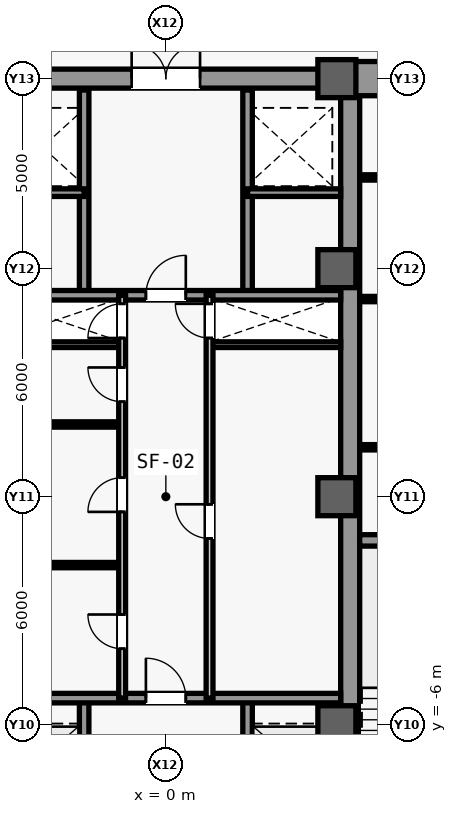
"""IFC4 building model, lengths in metres.
Left out: names, types, materials, properties, quantities, classifications, styles, units other than length and angle.
Written with IfcOpenShell. Run it as: python <this file> out.ifc"""

import sys

from ifc_helpers import new_model, si_unit, direction, frame, frame_2d, origin, origin_2d, place, context, subcontext, project, spatial, rectangle, extrude, source, transform, mapped, element, fill, save


model = new_model("IFC4")
c1 = context("Model", 3, precision=1e-05, world=origin(), true_north=direction((0.0, 1.0)))
c2 = subcontext(c1, "Body", "Model", "MODEL_VIEW")
j1 = project(units=[si_unit("LENGTHUNIT", "METRE"), si_unit("PLANEANGLEUNIT", "RADIAN")], contexts=[c1])
p1 = place(None, origin())
s1 = spatial("IfcSite", under=j1, at=p1, CompositionType="ELEMENT")
p2 = place(p1, origin())
s2 = spatial("IfcBuilding", under=s1, at=p2, CompositionType="ELEMENT")
p3 = place(p2, frame((0.0, 0.0, 6.6)))
s3 = spatial("IfcBuildingStorey", under=s2, at=p3, CompositionType="ELEMENT", Elevation=6.6)
m1 = source(origin(), c2, "Body", "SweptSolid", [
    extrude(rectangle(XDim=21.4, YDim=0.5, at=frame_2d((10.7, 0.0))), origin(), (0.0, 0.0, 1.0), 5.08),
])
p4 = place(p3, frame((4.85, -10.7, 0.0), z_axis=(0.0, 0.0, 1.0), x_axis=(0.0, 1.0, 0.0)))
e1 = element("IfcWall", 1, at=p4, inside=s3, PredefinedType="SHEAR", context=c2, shape_type="MappedRepresentation", body=[
    mapped(m1, transform((0.0, 0.0, 0.0), scale=1.0)),
])
m2 = source(origin(), c2, "Body", "SweptSolid", [
    extrude(rectangle(XDim=5.85, YDim=0.9, at=frame_2d((2.925, 0.0))), origin(), (0.0, 0.0, 1.0), 5.08),
])
p5 = place(p3, frame((4.85, 11.0, 0.0), z_axis=(0.0, 0.0, 1.0), x_axis=(1.0, 0.0, 0.0)))
e2 = element("IfcWall", 2, at=p5, inside=s3, PredefinedType="SHEAR", context=c2, shape_type="MappedRepresentation", body=[
    mapped(m2, transform((0.0, 0.0, 0.0), scale=1.0)),
])
m3 = source(origin(), c2, "Body", "SweptSolid", [
    extrude(rectangle(XDim=1.05, YDim=2.2, at=frame_2d((0.525, 1.1))), frame((0.0, 0.46, 0.0), z_axis=(0.0, -1.0, 0.0), x_axis=(1.0, 0.0, 0.0)), (0.0, 0.0, 1.0), 0.92),
])
p6 = place(p5, frame((1.375, 0.0, 0.0)))
e3 = element("IfcOpeningElement", 3, at=p6, cuts=e2, PredefinedType="OPENING", context=c2, shape_type="MappedRepresentation", body=[
    mapped(m3, transform((0.0, 0.0, 0.0), scale=1.0)),
])
m4 = source(origin(), c2, "Body", "SweptSolid", [
    extrude(rectangle(XDim=5.6, YDim=0.3, at=frame_2d((2.8, 0.0))), origin(), (0.0, 0.0, 1.0), 5.08),
])
p7 = place(p3, frame((5.1, -1.15, 0.0), z_axis=(0.0, 0.0, 1.0), x_axis=(1.0, 0.0, 0.0)))
e4 = element("IfcWall", 4, at=p7, inside=s3, PredefinedType="SHEAR", context=c2, shape_type="MappedRepresentation", body=[
    mapped(m4, transform((0.0, 0.0, 0.0), scale=1.0)),
])
m5 = source(origin(), c2, "Body", "SweptSolid", [
    extrude(rectangle(XDim=9.2, YDim=0.5, at=frame_2d((4.6, 0.0))), origin(), (0.0, 0.0, 1.0), 5.08),
])
p8 = place(p3, frame((-4.6, 11.0, 0.0), z_axis=(0.0, 0.0, 1.0), x_axis=(1.0, 0.0, 0.0)))
e5 = element("IfcWall", 5, at=p8, inside=s3, PredefinedType="SHEAR", context=c2, shape_type="MappedRepresentation", body=[
    mapped(m5, transform((0.0, 0.0, 0.0), scale=1.0)),
])
m6 = source(origin(), c2, "Body", "SweptSolid", [
    extrude(rectangle(XDim=1.8, YDim=2.25, at=frame_2d((0.9, 1.125))), frame((0.0, 0.26, 0.0), z_axis=(0.0, -1.0, 0.0), x_axis=(1.0, 0.0, 0.0)), (0.0, 0.0, 1.0), 0.52),
])
p9 = place(p8, frame((3.7, 0.0, 0.0)))
e6 = element("IfcOpeningElement", 6, at=p9, cuts=e5, PredefinedType="OPENING", context=c2, shape_type="MappedRepresentation", body=[
    mapped(m6, transform((0.0, 0.0, 0.0), scale=1.0)),
])
m7 = source(origin(), c2, "Body", "SweptSolid", [
    extrude(rectangle(XDim=1.0, YDim=1.0, at=origin_2d()), origin(), (0.0, 0.0, 1.0), 5.4),
])
for number, where, z_axis, x_axis in (
    (7, (4.5, -6.0, 0.0), (0.0, 0.0, 1.0), (1.0, 0.0, 0.0)),
    (8, (4.5, 0.0, 0.0), (0.0, 0.0, 1.0), (1.0, 0.0, 0.0)),
    (9, (4.5, 6.0, 0.0), (0.0, 0.0, 1.0), (1.0, 0.0, 0.0)),
    (10, (4.5, 11.0, 0.0), (0.0, 0.0, 1.0), (1.0, 0.0, 0.0)),
):
    element("IfcColumn", number, at=place(p3, frame(where, z_axis=z_axis, x_axis=x_axis)), inside=s3, PredefinedType="COLUMN", context=c2, shape_type="MappedRepresentation", body=[
        mapped(m7, transform((0.0, 0.0, 0.0), scale=1.0)),
    ])
m8 = source(origin(), c2, "Body", "SweptSolid", [
    extrude(rectangle(XDim=3.15, YDim=0.14, at=frame_2d((1.575, 0.0))), origin(), (0.0, 0.0, 1.0), 5.08),
])
p10 = place(p3, frame((5.1, 1.3, 0.0), z_axis=(0.0, 0.0, 1.0), x_axis=(1.0, 0.0, 0.0)))
e11 = element("IfcWall", 11, at=p10, inside=s3, PredefinedType="PARTITIONING", context=c2, shape_type="MappedRepresentation", body=[
    mapped(m8, transform((0.0, 0.0, 0.0), scale=1.0)),
])
p11 = place(p3, frame((5.1, 8.4, 0.0), z_axis=(0.0, 0.0, 1.0), x_axis=(1.0, 0.0, 0.0)))
e12 = element("IfcWall", 12, at=p11, inside=s3, PredefinedType="PARTITIONING", context=c2, shape_type="MappedRepresentation", body=[
    mapped(m8, transform((0.0, 0.0, 0.0), scale=1.0)),
])
m9 = source(origin(), c2, "Body", "SweptSolid", [
    extrude(rectangle(XDim=0.9, YDim=2.15, at=frame_2d((0.45, 1.075))), frame((0.0, 0.08, 0.0), z_axis=(0.0, -1.0, 0.0), x_axis=(1.0, 0.0, 0.0)), (0.0, 0.0, 1.0), 0.16),
])
p12 = place(p11, frame((1.13, 0.0, 0.0)))
e13 = element("IfcOpeningElement", 13, at=p12, cuts=e12, PredefinedType="OPENING", context=c2, shape_type="MappedRepresentation", body=[
    mapped(m9, transform((0.0, 0.0, 0.0), scale=1.0)),
])
p13 = place(p3, frame((5.1, 5.2, 0.0), z_axis=(0.0, 0.0, 1.0), x_axis=(1.0, 0.0, 0.0)))
e14 = element("IfcWall", 14, at=p13, inside=s3, PredefinedType="PARTITIONING", context=c2, shape_type="MappedRepresentation", body=[
    mapped(m8, transform((0.0, 0.0, 0.0), scale=1.0)),
])
p14 = place(p13, frame((1.13, 0.0, 0.0)))
e15 = element("IfcOpeningElement", 15, at=p14, cuts=e14, PredefinedType="OPENING", context=c2, shape_type="MappedRepresentation", body=[
    mapped(m9, transform((0.0, 0.0, 0.0), scale=1.0)),
])
m10 = source(origin(), c2, "Body", "SweptSolid", [
    extrude(rectangle(XDim=3.45, YDim=0.15, at=frame_2d((1.725, 0.0))), origin(), (0.0, 0.0, 1.0), 5.08),
])
for number, where, z_axis, x_axis in (
    (16, (-4.6, 4.0, 0.0), (0.0, 0.0, 1.0), (1.0, 0.0, 0.0)),
    (17, (1.15, 4.0, 0.0), (0.0, 0.0, 1.0), (1.0, 0.0, 0.0)),
):
    element("IfcWall", number, at=place(p3, frame(where, z_axis=z_axis, x_axis=x_axis)), inside=s3, PredefinedType="PARTITIONING", context=c2, shape_type="MappedRepresentation", body=[
        mapped(m10, transform((0.0, 0.0, 0.0), scale=1.0)),
    ])
m11 = source(origin(), c2, "Body", "SweptSolid", [
    extrude(rectangle(XDim=5.4, YDim=0.25, at=frame_2d((2.7, 0.0))), origin(), (0.0, 0.0, 1.0), 5.08),
])
p15 = place(p3, frame((-2.15, -10.7, 0.0), z_axis=(0.0, 0.0, 1.0), x_axis=(0.0, 1.0, 0.0)))
e18 = element("IfcWall", 18, at=p15, inside=s3, PredefinedType="SHEAR", context=c2, shape_type="MappedRepresentation", body=[
    mapped(m11, transform((0.0, 0.0, 0.0), scale=1.0)),
])
m12 = source(origin(), c2, "Body", "SweptSolid", [
    extrude(rectangle(XDim=1.2, YDim=2.3, at=frame_2d((0.6, 1.15))), frame((0.0, 0.135, 0.0), z_axis=(0.0, -1.0, 0.0), x_axis=(1.0, 0.0, 0.0)), (0.0, 0.0, 1.0), 0.27),
])
p16 = place(p15, frame((0.9, 0.0, 0.0)))
e19 = element("IfcOpeningElement", 19, at=p16, cuts=e18, PredefinedType="OPENING", context=c2, shape_type="MappedRepresentation", body=[
    mapped(m12, transform((0.0, 0.0, 0.0), scale=1.0)),
])
p17 = place(p15, frame((3.2, 0.0, 0.0)))
e20 = element("IfcOpeningElement", 20, at=p17, cuts=e18, PredefinedType="OPENING", context=c2, shape_type="MappedRepresentation", body=[
    mapped(m12, transform((0.0, 0.0, 0.0), scale=1.0)),
])
p18 = place(p3, frame((2.15, -10.7, 0.0), z_axis=(0.0, 0.0, 1.0), x_axis=(0.0, 1.0, 0.0)))
e21 = element("IfcWall", 21, at=p18, inside=s3, PredefinedType="SHEAR", context=c2, shape_type="MappedRepresentation", body=[
    mapped(m11, transform((0.0, 0.0, 0.0), scale=1.0)),
])
p19 = place(p18, frame((0.9, 0.0, 0.0)))
e22 = element("IfcOpeningElement", 22, at=p19, cuts=e21, PredefinedType="OPENING", context=c2, shape_type="MappedRepresentation", body=[
    mapped(m12, transform((0.0, 0.0, 0.0), scale=1.0)),
])
p20 = place(p18, frame((3.2, 0.0, 0.0)))
e23 = element("IfcOpeningElement", 23, at=p20, cuts=e21, PredefinedType="OPENING", context=c2, shape_type="MappedRepresentation", body=[
    mapped(m12, transform((0.0, 0.0, 0.0), scale=1.0)),
])
m13 = source(origin(), c2, "Body", "SweptSolid", [
    extrude(rectangle(XDim=9.2, YDim=0.25, at=frame_2d((4.6, 0.0))), origin(), (0.0, 0.0, 1.0), 5.08),
])
p21 = place(p3, frame((-4.6, -5.3, 0.0), z_axis=(0.0, 0.0, 1.0), x_axis=(1.0, 0.0, 0.0)))
e24 = element("IfcWall", 24, at=p21, inside=s3, PredefinedType="SHEAR", context=c2, shape_type="MappedRepresentation", body=[
    mapped(m13, transform((0.0, 0.0, 0.0), scale=1.0)),
])
m14 = source(origin(), c2, "Body", "SweptSolid", [
    extrude(rectangle(XDim=1.05, YDim=2.2, at=frame_2d((0.525, 1.1))), frame((0.0, 0.135, 0.0), z_axis=(0.0, -1.0, 0.0), x_axis=(1.0, 0.0, 0.0)), (0.0, 0.0, 1.0), 0.27),
])
p22 = place(p21, frame((4.075, 0.0, 0.0)))
e25 = element("IfcOpeningElement", 25, at=p22, cuts=e24, PredefinedType="OPENING", context=c2, shape_type="MappedRepresentation", body=[
    mapped(m14, transform((0.0, 0.0, 0.0), scale=1.0)),
])
for number, where, z_axis, x_axis in (
    (26, (-2.15, 5.3, 0.0), (0.0, 0.0, 1.0), (0.0, 1.0, 0.0)),
    (27, (2.15, 5.3, 0.0), (0.0, 0.0, 1.0), (0.0, 1.0, 0.0)),
):
    element("IfcWall", number, at=place(p3, frame(where, z_axis=z_axis, x_axis=x_axis)), inside=s3, PredefinedType="SHEAR", context=c2, shape_type="MappedRepresentation", body=[
        mapped(m11, transform((0.0, 0.0, 0.0), scale=1.0)),
    ])
m15 = source(origin(), c2, "Body", "SweptSolid", [
    extrude(rectangle(XDim=2.45, YDim=0.2, at=frame_2d((1.225, 0.0))), origin(), (0.0, 0.0, 1.0), 5.08),
])
for number, where, z_axis, x_axis in (
    (28, (-4.6, 8.0, 0.0), (0.0, 0.0, 1.0), (1.0, 0.0, 0.0)),
    (29, (2.15, 8.0, 0.0), (0.0, 0.0, 1.0), (1.0, 0.0, 0.0)),
):
    element("IfcWall", number, at=place(p3, frame(where, z_axis=z_axis, x_axis=x_axis)), inside=s3, PredefinedType="SHEAR", context=c2, shape_type="MappedRepresentation", body=[
        mapped(m15, transform((0.0, 0.0, 0.0), scale=1.0)),
    ])
p23 = place(p3, frame((-4.6, 5.3, 0.0), z_axis=(0.0, 0.0, 1.0), x_axis=(1.0, 0.0, 0.0)))
e30 = element("IfcWall", 30, at=p23, inside=s3, PredefinedType="SHEAR", context=c2, shape_type="MappedRepresentation", body=[
    mapped(m13, transform((0.0, 0.0, 0.0), scale=1.0)),
])
p24 = place(p23, frame((4.075, 0.0, 0.0)))
e31 = element("IfcOpeningElement", 31, at=p24, cuts=e30, PredefinedType="OPENING", context=c2, shape_type="MappedRepresentation", body=[
    mapped(m14, transform((0.0, 0.0, 0.0), scale=1.0)),
])
m16 = source(origin(), c2, "Body", "SweptSolid", [
    extrude(rectangle(XDim=3.45, YDim=0.14, at=frame_2d((1.725, 0.0))), origin(), (0.0, 0.0, 1.0), 5.08),
])
for number, where, z_axis, x_axis in (
    (32, (-4.6, -1.8, 0.0), (0.0, 0.0, 1.0), (1.0, 0.0, 0.0)),
    (33, (-4.6, 1.9, 0.0), (0.0, 0.0, 1.0), (1.0, 0.0, 0.0)),
):
    element("IfcWall", number, at=place(p3, frame(where, z_axis=z_axis, x_axis=x_axis)), inside=s3, PredefinedType="PARTITIONING", context=c2, shape_type="MappedRepresentation", body=[
        mapped(m16, transform((0.0, 0.0, 0.0), scale=1.0)),
    ])
m17 = source(origin(), c2, "Body", "SweptSolid", [
    extrude(rectangle(XDim=10.6, YDim=0.18, at=frame_2d((5.3, 0.0))), origin(), (0.0, 0.0, 1.0), 5.08),
])
p25 = place(p3, frame((-1.15, -5.3, 0.0), z_axis=(0.0, 0.0, 1.0), x_axis=(0.0, 1.0, 0.0)))
e34 = element("IfcWall", 34, at=p25, inside=s3, PredefinedType="PARTITIONING", context=c2, shape_type="MappedRepresentation", body=[
    mapped(m17, transform((0.0, 0.0, 0.0), scale=1.0)),
])
m18 = source(origin(), c2, "Body", "SweptSolid", [
    extrude(rectangle(XDim=0.9, YDim=2.15, at=frame_2d((0.45, 1.075))), frame((0.0, 0.1, 0.0), z_axis=(0.0, -1.0, 0.0), x_axis=(1.0, 0.0, 0.0)), (0.0, 0.0, 1.0), 0.2),
])
p26 = place(p25, frame((1.3, 0.0, 0.0)))
e35 = element("IfcOpeningElement", 35, at=p26, cuts=e34, PredefinedType="OPENING", context=c2, shape_type="MappedRepresentation", body=[
    mapped(m18, transform((0.0, 0.0, 0.0), scale=1.0)),
])
p27 = place(p25, frame((4.9, 0.0, 0.0)))
e36 = element("IfcOpeningElement", 36, at=p27, cuts=e34, PredefinedType="OPENING", context=c2, shape_type="MappedRepresentation", body=[
    mapped(m18, transform((0.0, 0.0, 0.0), scale=1.0)),
])
p28 = place(p25, frame((7.8, 0.0, 0.0)))
e37 = element("IfcOpeningElement", 37, at=p28, cuts=e34, PredefinedType="OPENING", context=c2, shape_type="MappedRepresentation", body=[
    mapped(m18, transform((0.0, 0.0, 0.0), scale=1.0)),
])
p29 = place(p25, frame((9.475, 0.0, 0.0)))
e38 = element("IfcOpeningElement", 38, at=p29, cuts=e34, PredefinedType="OPENING", context=c2, shape_type="MappedRepresentation", body=[
    mapped(m18, transform((0.0, 0.0, 0.0), scale=1.0)),
])
p30 = place(p3, frame((1.15, -5.3, 0.0), z_axis=(0.0, 0.0, 1.0), x_axis=(0.0, 1.0, 0.0)))
e39 = element("IfcWall", 39, at=p30, inside=s3, PredefinedType="PARTITIONING", context=c2, shape_type="MappedRepresentation", body=[
    mapped(m17, transform((0.0, 0.0, 0.0), scale=1.0)),
])
p31 = place(p30, frame((4.2, 0.0, 0.0)))
e40 = element("IfcOpeningElement", 40, at=p31, cuts=e39, PredefinedType="OPENING", context=c2, shape_type="MappedRepresentation", body=[
    mapped(m18, transform((0.0, 0.0, 0.0), scale=1.0)),
])
p32 = place(p30, frame((9.475, 0.0, 0.0)))
e41 = element("IfcOpeningElement", 41, at=p32, cuts=e39, PredefinedType="OPENING", context=c2, shape_type="MappedRepresentation", body=[
    mapped(m18, transform((0.0, 0.0, 0.0), scale=1.0)),
])
m19 = source(origin(), c2, "Body", "SweptSolid", [
    extrude(rectangle(XDim=1.05, YDim=2.2, at=frame_2d((0.525, 1.1))), frame((0.0, 0.025, 0.0), z_axis=(0.0, -1.0, 0.0), x_axis=(1.0, 0.0, 0.0)), (0.0, 0.0, 1.0), 0.05),
])
p33 = place(p22, origin())
e42 = element("IfcDoor", 42, at=p33, inside=s3, OperationType="SINGLE_SWING_LEFT", PredefinedType="DOOR", context=c2, shape_type="MappedRepresentation", body=[
    mapped(m19, transform((0.0, 0.0, 0.0), scale=1.0)),
])
fill(e25, e42)
p34 = place(p24, origin())
e43 = element("IfcDoor", 43, at=p34, inside=s3, OperationType="SINGLE_SWING_RIGHT", PredefinedType="DOOR", context=c2, shape_type="MappedRepresentation", body=[
    mapped(m19, transform((0.0, 0.0, 0.0), scale=1.0)),
])
fill(e31, e43)
m20 = source(origin(), c2, "Body", "SweptSolid", [
    extrude(rectangle(XDim=1.8, YDim=2.25, at=frame_2d((0.9, 1.125))), frame((0.0, 0.025, 0.0), z_axis=(0.0, -1.0, 0.0), x_axis=(1.0, 0.0, 0.0)), (0.0, 0.0, 1.0), 0.05),
])
p35 = place(p9, origin())
e44 = element("IfcDoor", 44, at=p35, inside=s3, OperationType="SINGLE_SWING_RIGHT", PredefinedType="DOOR", context=c2, shape_type="MappedRepresentation", body=[
    mapped(m20, transform((0.0, 0.0, 0.0), scale=1.0)),
])
fill(e6, e44)
m21 = source(origin(), c2, "Body", "SweptSolid", [
    extrude(rectangle(XDim=0.9, YDim=2.15, at=frame_2d((0.45, 1.075))), frame((0.0, 0.025, 0.0), z_axis=(0.0, -1.0, 0.0), x_axis=(1.0, 0.0, 0.0)), (0.0, 0.0, 1.0), 0.05),
])
p36 = place(p26, origin())
e45 = element("IfcDoor", 45, at=p36, inside=s3, OperationType="SINGLE_SWING_RIGHT", PredefinedType="DOOR", context=c2, shape_type="MappedRepresentation", body=[
    mapped(m21, transform((0.0, 0.0, 0.0), scale=1.0)),
])
fill(e35, e45)
p37 = place(p27, origin())
e46 = element("IfcDoor", 46, at=p37, inside=s3, OperationType="SINGLE_SWING_LEFT", PredefinedType="DOOR", context=c2, shape_type="MappedRepresentation", body=[
    mapped(m21, transform((0.0, 0.0, 0.0), scale=1.0)),
])
fill(e36, e46)
p38 = place(p28, origin())
e47 = element("IfcDoor", 47, at=p38, inside=s3, OperationType="SINGLE_SWING_RIGHT", PredefinedType="DOOR", context=c2, shape_type="MappedRepresentation", body=[
    mapped(m21, transform((0.0, 0.0, 0.0), scale=1.0)),
])
fill(e37, e47)
p39 = place(p31, origin())
e48 = element("IfcDoor", 48, at=p39, inside=s3, OperationType="SINGLE_SWING_RIGHT", PredefinedType="DOOR", context=c2, shape_type="MappedRepresentation", body=[
    mapped(m21, transform((0.0, 0.0, 0.0), scale=1.0)),
])
fill(e40, e48)
p40 = place(p29, origin())
e49 = element("IfcDoor", 49, at=p40, inside=s3, OperationType="SINGLE_SWING_LEFT", PredefinedType="DOOR", context=c2, shape_type="MappedRepresentation", body=[
    mapped(m21, transform((0.0, 0.0, 0.0), scale=1.0)),
])
fill(e38, e49)
p41 = place(p32, origin())
e50 = element("IfcDoor", 50, at=p41, inside=s3, OperationType="SINGLE_SWING_RIGHT", PredefinedType="DOOR", context=c2, shape_type="MappedRepresentation", body=[
    mapped(m21, transform((0.0, 0.0, 0.0), scale=1.0)),
])
fill(e41, e50)
save(model, sys.argv[1])
